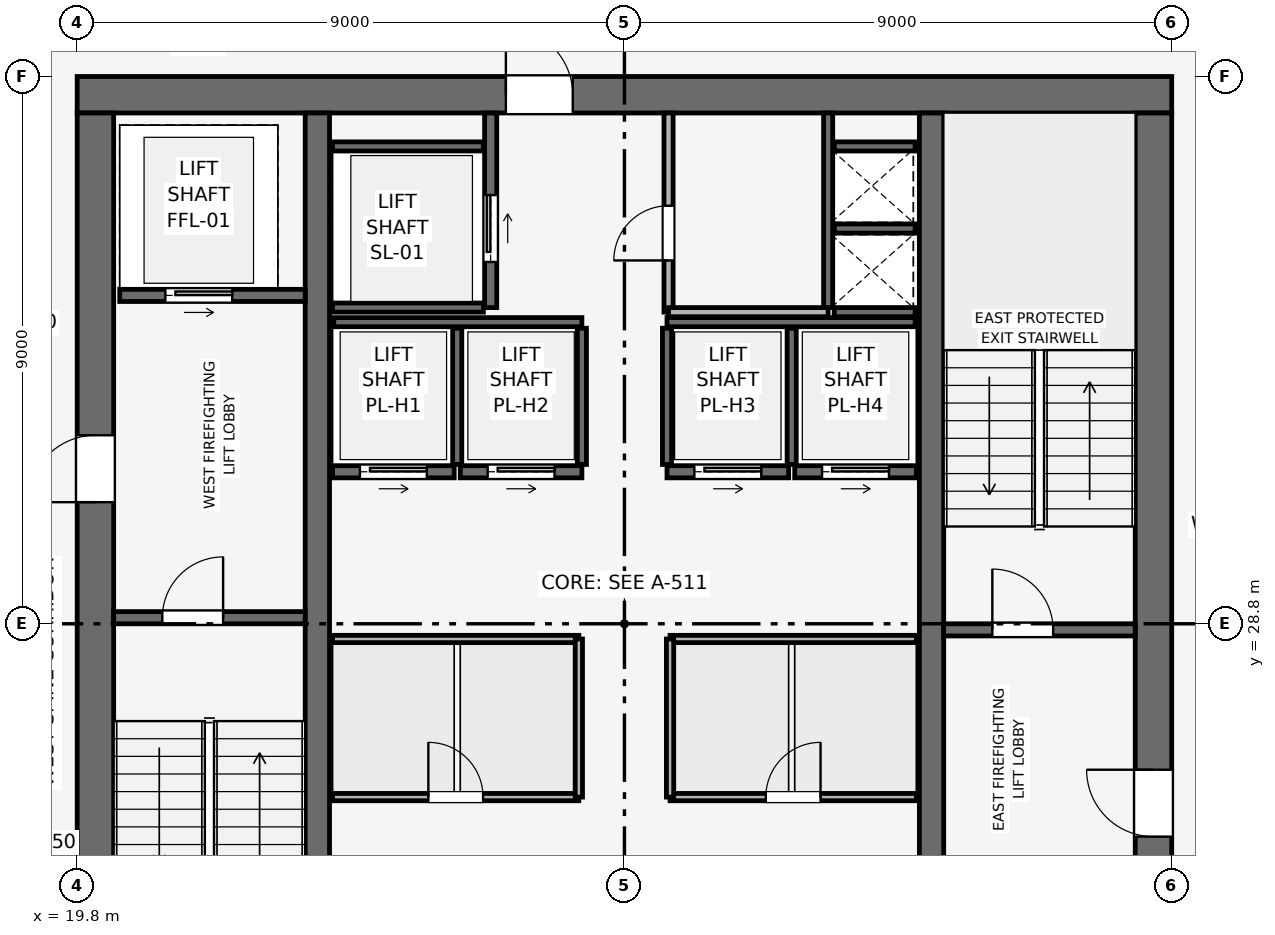
"""IFC4 building model, lengths in metres.
Left out: names, types, materials, properties, quantities, classifications, styles, units other than length and angle.
Written with IfcOpenShell. Run it as: python <this file> out.ifc"""

import sys

from ifc_helpers import new_model, si_unit, direction, frame, frame_2d, origin, place, context, subcontext, project, spatial, rectangle, extrude, element, fill, save


model = new_model("IFC4")
c1 = context("Model", 3, precision=1e-05, world=origin(), true_north=direction((0.0, 1.0)))
c2 = subcontext(c1, "Body", "Model", "MODEL_VIEW")
j1 = project(units=[si_unit("LENGTHUNIT", "METRE"), si_unit("PLANEANGLEUNIT", "RADIAN")], contexts=[c1])
p1 = place(None, origin())
s1 = spatial("IfcSite", under=j1, at=p1, CompositionType="ELEMENT")
p2 = place(p1, origin())
s2 = spatial("IfcBuilding", under=s1, at=p2, CompositionType="ELEMENT")
p3 = place(p2, frame((0.0, 0.0, 299.25)))
s3 = spatial("IfcBuildingStorey", under=s2, at=p3, CompositionType="ELEMENT", Elevation=299.25)
p4 = place(p3, frame((19.8, 37.5, 0.0), z_axis=(0.0, 0.0, 1.0), x_axis=(1.0, 0.0, 0.0)))
e1 = element("IfcWall", 1, at=p4, inside=s3, PredefinedType="SHEAR", context=c2, shape_type="SweptSolid", body=[
    extrude(rectangle(XDim=18.0, YDim=0.6, at=frame_2d((9.0, 0.0))), origin(), (0.0, 0.0, 1.0), 3.75),
])
p5 = place(p4, frame((7.05, 0.0, 0.0)))
e2 = element("IfcOpeningElement", 2, at=p5, cuts=e1, PredefinedType="OPENING", context=c2, shape_type="SweptSolid", body=[
    extrude(rectangle(XDim=1.1, YDim=2.15, at=frame_2d((0.55, 1.075))), frame((0.0, 0.31, 0.0), z_axis=(0.0, -1.0, 0.0), x_axis=(1.0, 0.0, 0.0)), (0.0, 0.0, 1.0), 0.62),
])
p6 = place(p3, frame((20.1, 20.4, 0.0), z_axis=(0.0, 0.0, 1.0), x_axis=(0.0, 1.0, 0.0)))
e3 = element("IfcWall", 3, at=p6, inside=s3, PredefinedType="SHEAR", context=c2, shape_type="SweptSolid", body=[
    extrude(rectangle(XDim=16.8, YDim=0.6, at=frame_2d((8.4, 0.0))), origin(), (0.0, 0.0, 1.0), 3.75),
])
p7 = place(p6, frame((10.4, 0.0, 0.0)))
e4 = element("IfcOpeningElement", 4, at=p7, cuts=e3, PredefinedType="OPENING", context=c2, shape_type="SweptSolid", body=[
    extrude(rectangle(XDim=1.1, YDim=2.15, at=frame_2d((0.55, 1.075))), frame((0.0, 0.31, 0.0), z_axis=(0.0, -1.0, 0.0), x_axis=(1.0, 0.0, 0.0)), (0.0, 0.0, 1.0), 0.62),
])
p8 = place(p3, frame((37.5, 20.4, 0.0), z_axis=(0.0, 0.0, 1.0), x_axis=(0.0, 1.0, 0.0)))
e5 = element("IfcWall", 5, at=p8, inside=s3, PredefinedType="SHEAR", context=c2, shape_type="SweptSolid", body=[
    extrude(rectangle(XDim=16.8, YDim=0.6, at=frame_2d((8.4, 0.0))), origin(), (0.0, 0.0, 1.0), 3.75),
])
p9 = place(p8, frame((4.9, 0.0, 0.0)))
e6 = element("IfcOpeningElement", 6, at=p9, cuts=e5, PredefinedType="OPENING", context=c2, shape_type="SweptSolid", body=[
    extrude(rectangle(XDim=1.1, YDim=2.15, at=frame_2d((0.55, 1.075))), frame((0.0, 0.31, 0.0), z_axis=(0.0, -1.0, 0.0), x_axis=(1.0, 0.0, 0.0)), (0.0, 0.0, 1.0), 0.62),
])
for number, where, z_axis, x_axis in (
    (7, (23.75, 20.4, 0.0), (0.0, 0.0, 1.0), (0.0, 1.0, 0.0)),
    (8, (33.85, 20.4, 0.0), (0.0, 0.0, 1.0), (0.0, 1.0, 0.0)),
):
    element("IfcWall", number, at=place(p3, frame(where, z_axis=z_axis, x_axis=x_axis)), inside=s3, PredefinedType="SHEAR", context=c2, shape_type="SweptSolid", body=[
        extrude(rectangle(XDim=16.8, YDim=0.4, at=frame_2d((8.4, 0.0))), origin(), (0.0, 0.0, 1.0), 3.75),
    ])
p10 = place(p3, frame((20.4, 28.9, 0.0), z_axis=(0.0, 0.0, 1.0), x_axis=(1.0, 0.0, 0.0)))
e9 = element("IfcWall", 9, at=p10, inside=s3, PredefinedType="SHEAR", context=c2, shape_type="SweptSolid", body=[
    extrude(rectangle(XDim=3.15, YDim=0.2, at=frame_2d((1.575, 0.0))), origin(), (0.0, 0.0, 1.0), 3.51),
])
p11 = place(p10, frame((0.8, 0.0, 0.0)))
e10 = element("IfcOpeningElement", 10, at=p11, cuts=e9, PredefinedType="OPENING", context=c2, shape_type="SweptSolid", body=[
    extrude(rectangle(XDim=1.0, YDim=2.1, at=frame_2d((0.5, 1.05))), frame((0.0, 0.11, 0.0), z_axis=(0.0, -1.0, 0.0), x_axis=(1.0, 0.0, 0.0)), (0.0, 0.0, 1.0), 0.22),
])
p12 = place(p3, frame((34.05, 28.7, 0.0), z_axis=(0.0, 0.0, 1.0), x_axis=(1.0, 0.0, 0.0)))
e11 = element("IfcWall", 11, at=p12, inside=s3, PredefinedType="SHEAR", context=c2, shape_type="SweptSolid", body=[
    extrude(rectangle(XDim=3.15, YDim=0.2, at=frame_2d((1.575, 0.0))), origin(), (0.0, 0.0, 1.0), 3.51),
])
p13 = place(p12, frame((0.8, 0.0, 0.0)))
e12 = element("IfcOpeningElement", 12, at=p13, cuts=e11, PredefinedType="OPENING", context=c2, shape_type="SweptSolid", body=[
    extrude(rectangle(XDim=1.0, YDim=2.1, at=frame_2d((0.5, 1.05))), frame((0.0, 0.11, 0.0), z_axis=(0.0, -1.0, 0.0), x_axis=(1.0, 0.0, 0.0)), (0.0, 0.0, 1.0), 0.22),
])
p14 = place(p3, frame((32.15, 34.0, 0.0), z_axis=(0.0, 0.0, 1.0), x_axis=(0.0, 1.0, 0.0)))
e13 = element("IfcWall", 13, at=p14, inside=s3, PredefinedType="SHEAR", context=c2, shape_type="SweptSolid", body=[
    extrude(rectangle(XDim=3.2, YDim=0.15, at=frame_2d((1.6, 0.0))), origin(), (0.0, 0.0, 1.0), 3.51),
])
for number, where, z_axis, x_axis in (
    (14, (32.25, 33.925, 0.0), (0.0, 0.0, 1.0), (1.0, 0.0, 0.0)),
    (15, (32.25, 35.3, 0.0), (0.0, 0.0, 1.0), (1.0, 0.0, 0.0)),
):
    element("IfcWall", number, at=place(p3, frame(where, z_axis=z_axis, x_axis=x_axis)), inside=s3, PredefinedType="SHEAR", context=c2, shape_type="SweptSolid", body=[
        extrude(rectangle(XDim=1.33, YDim=0.15, at=frame_2d((0.665, 0.0))), origin(), (0.0, 0.0, 1.0), 3.51),
    ])
p15 = place(p3, frame((20.5, 34.2, 0.0), z_axis=(0.0, 0.0, 1.0), x_axis=(1.0, 0.0, 0.0)))
e16 = element("IfcWall", 16, at=p15, inside=s3, PredefinedType="SHEAR", context=c2, shape_type="SweptSolid", body=[
    extrude(rectangle(XDim=3.05, YDim=0.2, at=frame_2d((1.525, 0.0))), origin(), (0.0, 0.0, 1.0), 3.51),
])
p16 = place(p15, frame((0.75, 0.0, 0.0)))
e17 = element("IfcOpeningElement", 17, at=p16, cuts=e16, PredefinedType="OPENING", context=c2, shape_type="SweptSolid", body=[
    extrude(rectangle(XDim=1.1, YDim=2.15, at=frame_2d((0.55, 1.075))), frame((0.0, 0.11, 0.0), z_axis=(0.0, -1.0, 0.0), x_axis=(1.0, 0.0, 0.0)), (0.0, 0.0, 1.0), 0.22),
])
p17 = place(p3, frame((26.6, 34.0, 0.0), z_axis=(0.0, 0.0, 1.0), x_axis=(0.0, 1.0, 0.0)))
e18 = element("IfcWall", 18, at=p17, inside=s3, PredefinedType="SHEAR", context=c2, shape_type="SweptSolid", body=[
    extrude(rectangle(XDim=3.2, YDim=0.2, at=frame_2d((1.6, 0.0))), origin(), (0.0, 0.0, 1.0), 3.51),
])
p18 = place(p17, frame((0.75, 0.0, 0.0)))
e19 = element("IfcOpeningElement", 19, at=p18, cuts=e18, PredefinedType="OPENING", context=c2, shape_type="SweptSolid", body=[
    extrude(rectangle(XDim=1.1, YDim=2.15, at=frame_2d((0.55, 1.075))), frame((0.0, 0.11, 0.0), z_axis=(0.0, -1.0, 0.0), x_axis=(1.0, 0.0, 0.0)), (0.0, 0.0, 1.0), 0.22),
])
for number, where, z_axis, x_axis in (
    (20, (24.0, 34.0, 0.0), (0.0, 0.0, 1.0), (1.0, 0.0, 0.0)),
    (21, (24.0, 36.65, 0.0), (0.0, 0.0, 1.0), (1.0, 0.0, 0.0)),
):
    element("IfcWall", number, at=place(p3, frame(where, z_axis=z_axis, x_axis=x_axis)), inside=s3, PredefinedType="SHEAR", context=c2, shape_type="SweptSolid", body=[
        extrude(rectangle(XDim=2.48, YDim=0.15, at=frame_2d((1.24, 0.0))), origin(), (0.0, 0.0, 1.0), 3.51),
    ])
p19 = place(p3, frame((24.0, 31.3, 0.0), z_axis=(0.0, 0.0, 1.0), x_axis=(1.0, 0.0, 0.0)))
e22 = element("IfcWall", 22, at=p19, inside=s3, PredefinedType="SHEAR", context=c2, shape_type="SweptSolid", body=[
    extrude(rectangle(XDim=2.0, YDim=0.2, at=frame_2d((1.0, 0.0))), origin(), (0.0, 0.0, 1.0), 3.51),
])
p20 = place(p19, frame((0.45, 0.0, 0.0)))
e23 = element("IfcOpeningElement", 23, at=p20, cuts=e22, PredefinedType="OPENING", context=c2, shape_type="SweptSolid", body=[
    extrude(rectangle(XDim=1.1, YDim=2.15, at=frame_2d((0.55, 1.075))), frame((0.0, 0.11, 0.0), z_axis=(0.0, -1.0, 0.0), x_axis=(1.0, 0.0, 0.0)), (0.0, 0.0, 1.0), 0.22),
])
p21 = place(p3, frame((26.1, 31.3, 0.0), z_axis=(0.0, 0.0, 1.0), x_axis=(1.0, 0.0, 0.0)))
e24 = element("IfcWall", 24, at=p21, inside=s3, PredefinedType="SHEAR", context=c2, shape_type="SweptSolid", body=[
    extrude(rectangle(XDim=2.0, YDim=0.2, at=frame_2d((1.0, 0.0))), origin(), (0.0, 0.0, 1.0), 3.51),
])
p22 = place(p21, frame((0.45, 0.0, 0.0)))
e25 = element("IfcOpeningElement", 25, at=p22, cuts=e24, PredefinedType="OPENING", context=c2, shape_type="SweptSolid", body=[
    extrude(rectangle(XDim=1.1, YDim=2.15, at=frame_2d((0.55, 1.075))), frame((0.0, 0.11, 0.0), z_axis=(0.0, -1.0, 0.0), x_axis=(1.0, 0.0, 0.0)), (0.0, 0.0, 1.0), 0.22),
])
p23 = place(p3, frame((29.5, 31.3, 0.0), z_axis=(0.0, 0.0, 1.0), x_axis=(1.0, 0.0, 0.0)))
e26 = element("IfcWall", 26, at=p23, inside=s3, PredefinedType="SHEAR", context=c2, shape_type="SweptSolid", body=[
    extrude(rectangle(XDim=2.0, YDim=0.2, at=frame_2d((1.0, 0.0))), origin(), (0.0, 0.0, 1.0), 3.51),
])
p24 = place(p23, frame((0.45, 0.0, 0.0)))
e27 = element("IfcOpeningElement", 27, at=p24, cuts=e26, PredefinedType="OPENING", context=c2, shape_type="SweptSolid", body=[
    extrude(rectangle(XDim=1.1, YDim=2.15, at=frame_2d((0.55, 1.075))), frame((0.0, 0.11, 0.0), z_axis=(0.0, -1.0, 0.0), x_axis=(1.0, 0.0, 0.0)), (0.0, 0.0, 1.0), 0.22),
])
p25 = place(p3, frame((31.6, 31.3, 0.0), z_axis=(0.0, 0.0, 1.0), x_axis=(1.0, 0.0, 0.0)))
e28 = element("IfcWall", 28, at=p25, inside=s3, PredefinedType="SHEAR", context=c2, shape_type="SweptSolid", body=[
    extrude(rectangle(XDim=2.0, YDim=0.2, at=frame_2d((1.0, 0.0))), origin(), (0.0, 0.0, 1.0), 3.51),
])
p26 = place(p25, frame((0.45, 0.0, 0.0)))
e29 = element("IfcOpeningElement", 29, at=p26, cuts=e28, PredefinedType="OPENING", context=c2, shape_type="SweptSolid", body=[
    extrude(rectangle(XDim=1.1, YDim=2.15, at=frame_2d((0.55, 1.075))), frame((0.0, 0.11, 0.0), z_axis=(0.0, -1.0, 0.0), x_axis=(1.0, 0.0, 0.0)), (0.0, 0.0, 1.0), 0.22),
])
p27 = place(p3, frame((32.25, 36.65, 0.0), z_axis=(0.0, 0.0, 1.0), x_axis=(1.0, 0.0, 0.0)))
e30 = element("IfcWall", 30, at=p27, inside=s3, PredefinedType="SHEAR", context=c2, shape_type="SweptSolid", body=[
    extrude(rectangle(XDim=1.33, YDim=0.15, at=frame_2d((0.665, 0.0))), origin(), (0.0, 0.0, 1.0), 3.51),
])
for number, where, z_axis, x_axis in (
    (31, (24.02, 33.76, 0.0), (0.0, 0.0, 1.0), (1.0, 0.0, 0.0)),
    (32, (29.5, 33.76, 0.0), (0.0, 0.0, 1.0), (1.0, 0.0, 0.0)),
):
    element("IfcWall", number, at=place(p3, frame(where, z_axis=z_axis, x_axis=x_axis)), inside=s3, PredefinedType="SHEAR", context=c2, shape_type="SweptSolid", body=[
        extrude(rectangle(XDim=4.08, YDim=0.15, at=frame_2d((2.04, 0.0))), origin(), (0.0, 0.0, 1.0), 3.51),
    ])
for number, where, z_axis, x_axis in (
    (33, (26.05, 31.42, 0.0), (0.0, 0.0, 1.0), (0.0, 1.0, 0.0)),
    (34, (28.1, 31.42, 0.0), (0.0, 0.0, 1.0), (0.0, 1.0, 0.0)),
    (35, (29.5, 31.42, 0.0), (0.0, 0.0, 1.0), (0.0, 1.0, 0.0)),
    (36, (31.55, 31.42, 0.0), (0.0, 0.0, 1.0), (0.0, 1.0, 0.0)),
):
    element("IfcWall", number, at=place(p3, frame(where, z_axis=z_axis, x_axis=x_axis)), inside=s3, PredefinedType="SHEAR", context=c2, shape_type="SweptSolid", body=[
        extrude(rectangle(XDim=2.24, YDim=0.15, at=frame_2d((1.12, 0.0))), origin(), (0.0, 0.0, 1.0), 3.51),
    ])
p28 = place(p3, frame((29.525, 33.925, 0.0), z_axis=(0.0, 0.0, 1.0), x_axis=(0.0, 1.0, 0.0)))
e37 = element("IfcWall", 37, at=p28, inside=s3, PredefinedType="PARTITIONING", context=c2, shape_type="SweptSolid", body=[
    extrude(rectangle(XDim=3.275, YDim=0.15, at=frame_2d((1.637, 0.0))), origin(), (0.0, 0.0, 1.0), 3.51),
])
p29 = place(p28, frame((0.85, 0.0, 0.0)))
e38 = element("IfcOpeningElement", 38, at=p29, cuts=e37, PredefinedType="OPENING", context=c2, shape_type="SweptSolid", body=[
    extrude(rectangle(XDim=0.9, YDim=2.1, at=frame_2d((0.45, 1.05))), frame((0.0, 0.085, 0.0), z_axis=(0.0, -1.0, 0.0), x_axis=(1.0, 0.0, 0.0)), (0.0, 0.0, 1.0), 0.17),
])
p30 = place(p3, frame((29.525, 33.925, 0.0), z_axis=(0.0, 0.0, 1.0), x_axis=(1.0, 0.0, 0.0)))
e39 = element("IfcWall", 39, at=p30, inside=s3, PredefinedType="PARTITIONING", context=c2, shape_type="SweptSolid", body=[
    extrude(rectangle(XDim=2.625, YDim=0.15, at=frame_2d((1.312, 0.0))), origin(), (0.0, 0.0, 1.0), 3.51),
])
p31 = place(p3, frame((24.0, 25.95, 0.0), z_axis=(0.0, 0.0, 1.0), x_axis=(1.0, 0.0, 0.0)))
e40 = element("IfcWall", 40, at=p31, inside=s3, PredefinedType="PARTITIONING", context=c2, shape_type="SweptSolid", body=[
    extrude(rectangle(XDim=4.05, YDim=0.12, at=frame_2d((2.025, 0.0))), origin(), (0.0, 0.0, 1.0), 3.51),
])
p32 = place(p31, frame((1.575, 0.0, 0.0)))
e41 = element("IfcOpeningElement", 41, at=p32, cuts=e40, PredefinedType="OPENING", context=c2, shape_type="SweptSolid", body=[
    extrude(rectangle(XDim=0.9, YDim=2.1, at=frame_2d((0.45, 1.05))), frame((0.0, 0.07, 0.0), z_axis=(0.0, -1.0, 0.0), x_axis=(1.0, 0.0, 0.0)), (0.0, 0.0, 1.0), 0.14),
])
p33 = place(p3, frame((24.0, 28.55, 0.0), z_axis=(0.0, 0.0, 1.0), x_axis=(1.0, 0.0, 0.0)))
e42 = element("IfcWall", 42, at=p33, inside=s3, PredefinedType="PARTITIONING", context=c2, shape_type="SweptSolid", body=[
    extrude(rectangle(XDim=4.05, YDim=0.12, at=frame_2d((2.025, 0.0))), origin(), (0.0, 0.0, 1.0), 3.51),
])
p34 = place(p3, frame((28.05, 25.95, 0.0), z_axis=(0.0, 0.0, 1.0), x_axis=(0.0, 1.0, 0.0)))
e43 = element("IfcWall", 43, at=p34, inside=s3, PredefinedType="PARTITIONING", context=c2, shape_type="SweptSolid", body=[
    extrude(rectangle(XDim=2.6, YDim=0.12, at=frame_2d((1.3, 0.0))), origin(), (0.0, 0.0, 1.0), 3.51),
])
p35 = place(p3, frame((29.55, 25.95, 0.0), z_axis=(0.0, 0.0, 1.0), x_axis=(1.0, 0.0, 0.0)))
e44 = element("IfcWall", 44, at=p35, inside=s3, PredefinedType="PARTITIONING", context=c2, shape_type="SweptSolid", body=[
    extrude(rectangle(XDim=4.05, YDim=0.12, at=frame_2d((2.025, 0.0))), origin(), (0.0, 0.0, 1.0), 3.51),
])
p36 = place(p35, frame((1.575, 0.0, 0.0)))
e45 = element("IfcOpeningElement", 45, at=p36, cuts=e44, PredefinedType="OPENING", context=c2, shape_type="SweptSolid", body=[
    extrude(rectangle(XDim=0.9, YDim=2.1, at=frame_2d((0.45, 1.05))), frame((0.0, 0.07, 0.0), z_axis=(0.0, -1.0, 0.0), x_axis=(1.0, 0.0, 0.0)), (0.0, 0.0, 1.0), 0.14),
])
p37 = place(p3, frame((29.55, 28.55, 0.0), z_axis=(0.0, 0.0, 1.0), x_axis=(1.0, 0.0, 0.0)))
e46 = element("IfcWall", 46, at=p37, inside=s3, PredefinedType="PARTITIONING", context=c2, shape_type="SweptSolid", body=[
    extrude(rectangle(XDim=4.05, YDim=0.12, at=frame_2d((2.025, 0.0))), origin(), (0.0, 0.0, 1.0), 3.51),
])
p38 = place(p3, frame((29.55, 25.95, 0.0), z_axis=(0.0, 0.0, 1.0), x_axis=(0.0, 1.0, 0.0)))
e47 = element("IfcWall", 47, at=p38, inside=s3, PredefinedType="PARTITIONING", context=c2, shape_type="SweptSolid", body=[
    extrude(rectangle(XDim=2.6, YDim=0.12, at=frame_2d((1.3, 0.0))), origin(), (0.0, 0.0, 1.0), 3.51),
])
p39 = place(p11, origin())
e48 = element("IfcDoor", 48, at=p39, inside=s3, OperationType="SINGLE_SWING_RIGHT", PredefinedType="DOOR", context=c2, shape_type="SweptSolid", body=[
    extrude(rectangle(XDim=1.0, YDim=2.1, at=frame_2d((0.5, 1.05))), frame((0.0, 0.025, 0.0), z_axis=(0.0, -1.0, 0.0), x_axis=(1.0, 0.0, 0.0)), (0.0, 0.0, 1.0), 0.05),
])
fill(e10, e48)
p40 = place(p13, origin())
e49 = element("IfcDoor", 49, at=p40, inside=s3, OperationType="SINGLE_SWING_LEFT", PredefinedType="DOOR", context=c2, shape_type="SweptSolid", body=[
    extrude(rectangle(XDim=1.0, YDim=2.1, at=frame_2d((0.5, 1.05))), frame((0.0, 0.025, 0.0), z_axis=(0.0, -1.0, 0.0), x_axis=(1.0, 0.0, 0.0)), (0.0, 0.0, 1.0), 0.05),
])
fill(e12, e49)
p41 = place(p16, origin())
e50 = element("IfcDoor", 50, at=p41, inside=s3, OperationType="SLIDING_TO_RIGHT", PredefinedType="DOOR", context=c2, shape_type="SweptSolid", body=[
    extrude(rectangle(XDim=1.1, YDim=2.15, at=frame_2d((0.55, 1.075))), frame((0.0, 0.025, 0.0), z_axis=(0.0, -1.0, 0.0), x_axis=(1.0, 0.0, 0.0)), (0.0, 0.0, 1.0), 0.05),
])
fill(e17, e50)
p42 = place(p18, origin())
e51 = element("IfcDoor", 51, at=p42, inside=s3, OperationType="SLIDING_TO_RIGHT", PredefinedType="DOOR", context=c2, shape_type="SweptSolid", body=[
    extrude(rectangle(XDim=1.1, YDim=2.15, at=frame_2d((0.55, 1.075))), frame((0.0, 0.025, 0.0), z_axis=(0.0, -1.0, 0.0), x_axis=(1.0, 0.0, 0.0)), (0.0, 0.0, 1.0), 0.05),
])
fill(e19, e51)
p43 = place(p20, origin())
e52 = element("IfcDoor", 52, at=p43, inside=s3, OperationType="SLIDING_TO_RIGHT", PredefinedType="DOOR", context=c2, shape_type="SweptSolid", body=[
    extrude(rectangle(XDim=1.1, YDim=2.15, at=frame_2d((0.55, 1.075))), frame((0.0, 0.025, 0.0), z_axis=(0.0, -1.0, 0.0), x_axis=(1.0, 0.0, 0.0)), (0.0, 0.0, 1.0), 0.05),
])
fill(e23, e52)
p44 = place(p22, origin())
e53 = element("IfcDoor", 53, at=p44, inside=s3, OperationType="SLIDING_TO_RIGHT", PredefinedType="DOOR", context=c2, shape_type="SweptSolid", body=[
    extrude(rectangle(XDim=1.1, YDim=2.15, at=frame_2d((0.55, 1.075))), frame((0.0, 0.025, 0.0), z_axis=(0.0, -1.0, 0.0), x_axis=(1.0, 0.0, 0.0)), (0.0, 0.0, 1.0), 0.05),
])
fill(e25, e53)
p45 = place(p24, origin())
e54 = element("IfcDoor", 54, at=p45, inside=s3, OperationType="SLIDING_TO_RIGHT", PredefinedType="DOOR", context=c2, shape_type="SweptSolid", body=[
    extrude(rectangle(XDim=1.1, YDim=2.15, at=frame_2d((0.55, 1.075))), frame((0.0, 0.025, 0.0), z_axis=(0.0, -1.0, 0.0), x_axis=(1.0, 0.0, 0.0)), (0.0, 0.0, 1.0), 0.05),
])
fill(e27, e54)
p46 = place(p26, origin())
e55 = element("IfcDoor", 55, at=p46, inside=s3, OperationType="SLIDING_TO_RIGHT", PredefinedType="DOOR", context=c2, shape_type="SweptSolid", body=[
    extrude(rectangle(XDim=1.1, YDim=2.15, at=frame_2d((0.55, 1.075))), frame((0.0, 0.025, 0.0), z_axis=(0.0, -1.0, 0.0), x_axis=(1.0, 0.0, 0.0)), (0.0, 0.0, 1.0), 0.05),
])
fill(e29, e55)
p47 = place(p29, origin())
e56 = element("IfcDoor", 56, at=p47, inside=s3, OperationType="SINGLE_SWING_LEFT", PredefinedType="DOOR", context=c2, shape_type="SweptSolid", body=[
    extrude(rectangle(XDim=0.9, YDim=2.1, at=frame_2d((0.45, 1.05))), frame((0.0, 0.025, 0.0), z_axis=(0.0, -1.0, 0.0), x_axis=(1.0, 0.0, 0.0)), (0.0, 0.0, 1.0), 0.05),
])
fill(e38, e56)
p48 = place(p32, origin())
e57 = element("IfcDoor", 57, at=p48, inside=s3, OperationType="SINGLE_SWING_LEFT", PredefinedType="DOOR", context=c2, shape_type="SweptSolid", body=[
    extrude(rectangle(XDim=0.9, YDim=2.1, at=frame_2d((0.45, 1.05))), frame((0.0, 0.025, 0.0), z_axis=(0.0, -1.0, 0.0), x_axis=(1.0, 0.0, 0.0)), (0.0, 0.0, 1.0), 0.05),
])
fill(e41, e57)
p49 = place(p36, origin())
e58 = element("IfcDoor", 58, at=p49, inside=s3, OperationType="SINGLE_SWING_RIGHT", PredefinedType="DOOR", context=c2, shape_type="SweptSolid", body=[
    extrude(rectangle(XDim=0.9, YDim=2.1, at=frame_2d((0.45, 1.05))), frame((0.0, 0.025, 0.0), z_axis=(0.0, -1.0, 0.0), x_axis=(1.0, 0.0, 0.0)), (0.0, 0.0, 1.0), 0.05),
])
fill(e45, e58)
p50 = place(p7, origin())
e59 = element("IfcDoor", 59, at=p50, inside=s3, OperationType="SINGLE_SWING_LEFT", PredefinedType="DOOR", context=c2, shape_type="SweptSolid", body=[
    extrude(rectangle(XDim=1.1, YDim=2.15, at=frame_2d((0.55, 1.075))), frame((0.0, 0.025, 0.0), z_axis=(0.0, -1.0, 0.0), x_axis=(1.0, 0.0, 0.0)), (0.0, 0.0, 1.0), 0.05),
])
fill(e4, e59)
p51 = place(p9, origin())
e60 = element("IfcDoor", 60, at=p51, inside=s3, OperationType="SINGLE_SWING_RIGHT", PredefinedType="DOOR", context=c2, shape_type="SweptSolid", body=[
    extrude(rectangle(XDim=1.1, YDim=2.15, at=frame_2d((0.55, 1.075))), frame((0.0, 0.025, 0.0), z_axis=(0.0, -1.0, 0.0), x_axis=(1.0, 0.0, 0.0)), (0.0, 0.0, 1.0), 0.05),
])
fill(e6, e60)
p52 = place(p5, origin())
e61 = element("IfcDoor", 61, at=p52, inside=s3, OperationType="SINGLE_SWING_LEFT", PredefinedType="DOOR", context=c2, shape_type="SweptSolid", body=[
    extrude(rectangle(XDim=1.1, YDim=2.15, at=frame_2d((0.55, 1.075))), frame((0.0, 0.025, 0.0), z_axis=(0.0, -1.0, 0.0), x_axis=(1.0, 0.0, 0.0)), (0.0, 0.0, 1.0), 0.05),
])
fill(e2, e61)
save(model, sys.argv[1])
